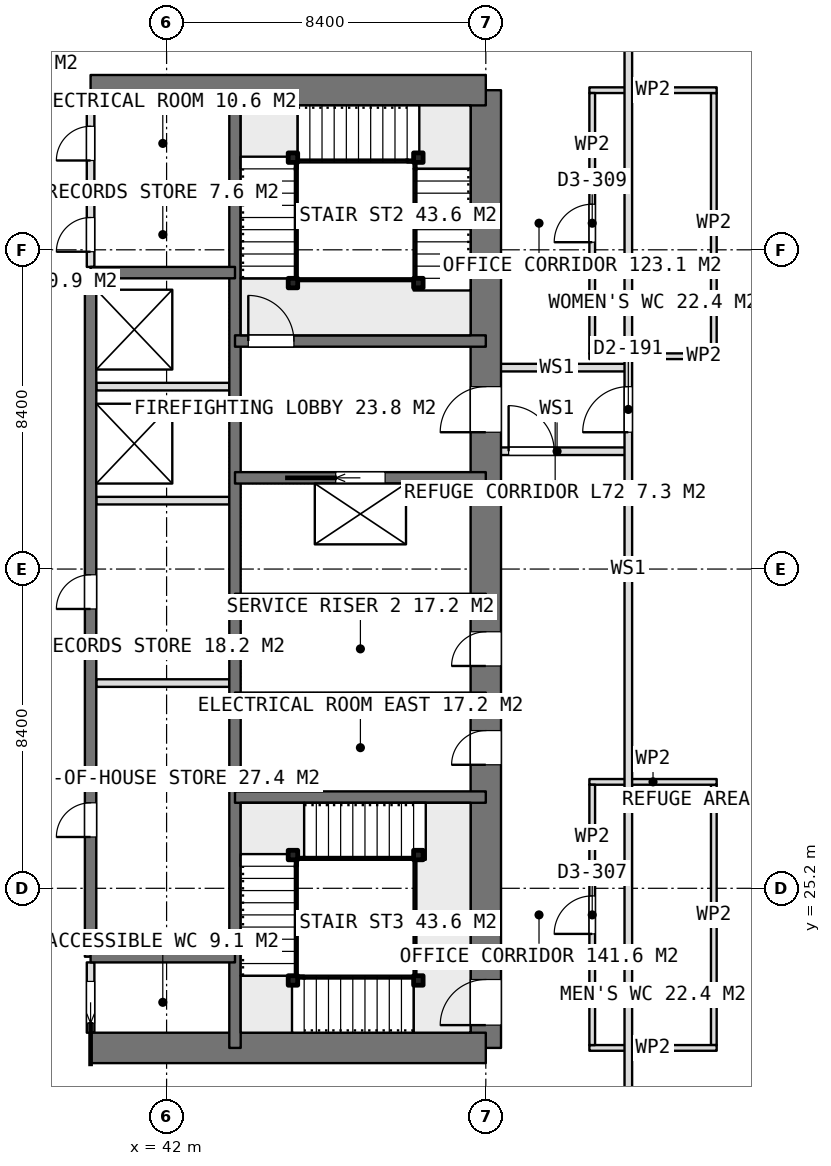
"""IFC4 building model, lengths in metres.
Left out: names, types, materials, properties, quantities, classifications, styles, units other than length and angle.
Written with IfcOpenShell. Run it as: python <this file> out.ifc"""

import sys

from ifc_helpers import new_model, si_unit, direction, frame, frame_2d, origin, origin_2d, place, context, subcontext, project, spatial, rectangle, extrude, element, fill, save


model = new_model("IFC4")
c1 = context("Model", 3, precision=1e-05, world=origin(), true_north=direction((0.0, 1.0)))
c2 = subcontext(c1, "Body", "Model", "MODEL_VIEW")
j1 = project(units=[si_unit("LENGTHUNIT", "METRE"), si_unit("PLANEANGLEUNIT", "RADIAN")], contexts=[c1])
p1 = place(None, origin())
s1 = spatial("IfcSite", under=j1, at=p1, CompositionType="ELEMENT")
p2 = place(p1, origin())
s2 = spatial("IfcBuilding", under=s1, at=p2, CompositionType="ELEMENT")
p3 = place(p2, frame((0.0, 0.0, 283.85)))
s3 = spatial("IfcBuildingStorey", under=s2, at=p3, CompositionType="ELEMENT", Elevation=283.85)
for number, where, z_axis, x_axis in (
    (1, (40.0, 21.0, 0.0), (0.0, 0.0, 1.0), (1.0, 0.0, 0.0)),
    (2, (40.0, 46.2, 0.0), (0.0, 0.0, 1.0), (1.0, 0.0, 0.0)),
):
    element("IfcWall", number, at=place(p3, frame(where, z_axis=z_axis, x_axis=x_axis)), inside=s3, PredefinedType="SHEAR", context=c2, shape_type="SweptSolid", body=[
        extrude(rectangle(XDim=10.4, YDim=0.8, at=frame_2d((5.2, 0.0))), origin(), (0.0, 0.0, 1.0), 3.75),
    ])
p4 = place(p3, frame((50.4, 21.0, 0.0), z_axis=(0.0, 0.0, 1.0), x_axis=(0.0, 1.0, 0.0)))
e3 = element("IfcWall", 3, at=p4, inside=s3, PredefinedType="SHEAR", context=c2, shape_type="SweptSolid", body=[
    extrude(rectangle(XDim=25.2, YDim=0.8, at=frame_2d((12.6, 0.0))), origin(), (0.0, 0.0, 1.0), 3.75),
])
p5 = place(p4, frame((16.2, 0.0, 0.0)))
e4 = element("IfcOpeningElement", 4, at=p5, cuts=e3, PredefinedType="OPENING", context=c2, shape_type="SweptSolid", body=[
    extrude(rectangle(XDim=1.2, YDim=2.1, at=frame_2d((0.6, 1.05))), frame((0.0, 0.41, 0.0), z_axis=(0.0, -1.0, 0.0), x_axis=(1.0, 0.0, 0.0)), (0.0, 0.0, 1.0), 0.82),
])
p6 = place(p4, frame((10.05, 0.0, 0.0)))
e5 = element("IfcOpeningElement", 5, at=p6, cuts=e3, PredefinedType="OPENING", context=c2, shape_type="SweptSolid", body=[
    extrude(rectangle(XDim=0.9, YDim=2.1, at=frame_2d((0.45, 1.05))), frame((0.0, 0.41, 0.0), z_axis=(0.0, -1.0, 0.0), x_axis=(1.0, 0.0, 0.0)), (0.0, 0.0, 1.0), 0.82),
])
p7 = place(p4, frame((7.45, 0.0, 0.0)))
e6 = element("IfcOpeningElement", 6, at=p7, cuts=e3, PredefinedType="OPENING", context=c2, shape_type="SweptSolid", body=[
    extrude(rectangle(XDim=0.9, YDim=2.1, at=frame_2d((0.45, 1.05))), frame((0.0, 0.41, 0.0), z_axis=(0.0, -1.0, 0.0), x_axis=(1.0, 0.0, 0.0)), (0.0, 0.0, 1.0), 0.82),
])
p8 = place(p4, frame((0.6, 0.0, 0.0)))
e7 = element("IfcOpeningElement", 7, at=p8, cuts=e3, PredefinedType="OPENING", context=c2, shape_type="SweptSolid", body=[
    extrude(rectangle(XDim=1.2, YDim=2.1, at=frame_2d((0.6, 1.05))), frame((0.0, 0.41, 0.0), z_axis=(0.0, -1.0, 0.0), x_axis=(1.0, 0.0, 0.0)), (0.0, 0.0, 1.0), 0.82),
])
p9 = place(p3, frame((43.8, 21.0, 0.0), z_axis=(0.0, 0.0, 1.0), x_axis=(0.0, 1.0, 0.0)))
e8 = element("IfcWall", 8, at=p9, inside=s3, PredefinedType="SHEAR", context=c2, shape_type="SweptSolid", body=[
    extrude(rectangle(XDim=25.2, YDim=0.3, at=frame_2d((12.6, 0.0))), origin(), (0.0, 0.0, 1.0), 3.75),
])
p10 = place(p3, frame((40.0, 23.4, 0.0), z_axis=(0.0, 0.0, 1.0), x_axis=(0.0, 1.0, 0.0)))
e9 = element("IfcWall", 9, at=p10, inside=s3, PredefinedType="SHEAR", context=c2, shape_type="SweptSolid", body=[
    extrude(rectangle(XDim=18.0, YDim=0.3, at=frame_2d((9.0, 0.0))), origin(), (0.0, 0.0, 1.0), 3.75),
])
p11 = place(p10, frame((3.15, 0.0, 0.0)))
e10 = element("IfcOpeningElement", 10, at=p11, cuts=e9, PredefinedType="OPENING", context=c2, shape_type="SweptSolid", body=[
    extrude(rectangle(XDim=0.9, YDim=2.1, at=frame_2d((0.45, 1.05))), frame((0.0, 0.16, 0.0), z_axis=(0.0, -1.0, 0.0), x_axis=(1.0, 0.0, 0.0)), (0.0, 0.0, 1.0), 0.32),
])
p12 = place(p10, frame((9.15, 0.0, 0.0)))
e11 = element("IfcOpeningElement", 11, at=p12, cuts=e9, PredefinedType="OPENING", context=c2, shape_type="SweptSolid", body=[
    extrude(rectangle(XDim=0.9, YDim=2.1, at=frame_2d((0.45, 1.05))), frame((0.0, 0.16, 0.0), z_axis=(0.0, -1.0, 0.0), x_axis=(1.0, 0.0, 0.0)), (0.0, 0.0, 1.0), 0.32),
])
for number, where, z_axis, x_axis in (
    (12, (40.0, 23.4, 0.0), (0.0, 0.0, 1.0), (1.0, 0.0, 0.0)),
    (13, (40.0, 41.4, 0.0), (0.0, 0.0, 1.0), (1.0, 0.0, 0.0)),
):
    element("IfcWall", number, at=place(p3, frame(where, z_axis=z_axis, x_axis=x_axis)), inside=s3, PredefinedType="SHEAR", context=c2, shape_type="SweptSolid", body=[
        extrude(rectangle(XDim=3.8, YDim=0.3, at=frame_2d((1.9, 0.0))), origin(), (0.0, 0.0, 1.0), 3.75),
    ])
for number, where, z_axis, x_axis in (
    (14, (43.8, 27.6, 0.0), (0.0, 0.0, 1.0), (1.0, 0.0, 0.0)),
    (15, (43.8, 30.2, 0.0), (0.0, 0.0, 1.0), (1.0, 0.0, 0.0)),
    (16, (43.8, 32.8, 0.0), (0.0, 0.0, 1.0), (1.0, 0.0, 0.0)),
):
    element("IfcWall", number, at=place(p3, frame(where, z_axis=z_axis, x_axis=x_axis)), inside=s3, PredefinedType="SHEAR", context=c2, shape_type="SweptSolid", body=[
        extrude(rectangle(XDim=6.6, YDim=0.3, at=frame_2d((3.3, 0.0))), origin(), (0.0, 0.0, 1.0), 3.75),
    ])
p13 = place(p3, frame((43.8, 36.0, 0.0), z_axis=(0.0, 0.0, 1.0), x_axis=(1.0, 0.0, 0.0)))
e17 = element("IfcWall", 17, at=p13, inside=s3, PredefinedType="SHEAR", context=c2, shape_type="SweptSolid", body=[
    extrude(rectangle(XDim=6.6, YDim=0.3, at=frame_2d((3.3, 0.0))), origin(), (0.0, 0.0, 1.0), 3.75),
])
p14 = place(p13, frame((2.65, 0.0, 0.0)))
e18 = element("IfcOpeningElement", 18, at=p14, cuts=e17, PredefinedType="OPENING", context=c2, shape_type="SweptSolid", body=[
    extrude(rectangle(XDim=1.3, YDim=2.1, at=frame_2d((0.65, 1.05))), frame((0.0, 0.16, 0.0), z_axis=(0.0, -1.0, 0.0), x_axis=(1.0, 0.0, 0.0)), (0.0, 0.0, 1.0), 0.32),
])
p15 = place(p3, frame((43.8, 39.6, 0.0), z_axis=(0.0, 0.0, 1.0), x_axis=(1.0, 0.0, 0.0)))
e19 = element("IfcWall", 19, at=p15, inside=s3, PredefinedType="SHEAR", context=c2, shape_type="SweptSolid", body=[
    extrude(rectangle(XDim=6.6, YDim=0.3, at=frame_2d((3.3, 0.0))), origin(), (0.0, 0.0, 1.0), 3.75),
])
p16 = place(p15, frame((0.35, 0.0, 0.0)))
e20 = element("IfcOpeningElement", 20, at=p16, cuts=e19, PredefinedType="OPENING", context=c2, shape_type="SweptSolid", body=[
    extrude(rectangle(XDim=1.2, YDim=2.1, at=frame_2d((0.6, 1.05))), frame((0.0, 0.16, 0.0), z_axis=(0.0, -1.0, 0.0), x_axis=(1.0, 0.0, 0.0)), (0.0, 0.0, 1.0), 0.32),
])
for number, where, z_axis, x_axis in (
    (21, (40.15, 35.4, 0.0), (0.0, 0.0, 1.0), (1.0, 0.0, 0.0)),
    (22, (40.15, 38.4, 0.0), (0.0, 0.0, 1.0), (1.0, 0.0, 0.0)),
):
    element("IfcWall", number, at=place(p3, frame(where, z_axis=z_axis, x_axis=x_axis)), inside=s3, PredefinedType="PARTITIONING", context=c2, shape_type="SweptSolid", body=[
        extrude(rectangle(XDim=3.5, YDim=0.2, at=frame_2d((1.75, 0.0))), origin(), (0.0, 0.0, 1.0), 3.5),
    ])
p17 = place(p3, frame((40.0, 21.4, 0.0), z_axis=(0.0, 0.0, 1.0), x_axis=(0.0, 1.0, 0.0)))
e23 = element("IfcWall", 23, at=p17, inside=s3, PredefinedType="PARTITIONING", context=c2, shape_type="SweptSolid", body=[
    extrude(rectangle(XDim=1.85, YDim=0.2, at=frame_2d((0.925, 0.0))), origin(), (0.0, 0.0, 1.0), 3.5),
])
p18 = place(p17, frame((0.25, 0.0, 0.0)))
e24 = element("IfcOpeningElement", 24, at=p18, cuts=e23, PredefinedType="OPENING", context=c2, shape_type="SweptSolid", body=[
    extrude(rectangle(XDim=1.1, YDim=2.1, at=frame_2d((0.55, 1.05))), frame((0.0, 0.11, 0.0), z_axis=(0.0, -1.0, 0.0), x_axis=(1.0, 0.0, 0.0)), (0.0, 0.0, 1.0), 0.22),
])
p19 = place(p3, frame((40.0, 41.55, 0.0), z_axis=(0.0, 0.0, 1.0), x_axis=(0.0, 1.0, 0.0)))
e25 = element("IfcWall", 25, at=p19, inside=s3, PredefinedType="PARTITIONING", context=c2, shape_type="SweptSolid", body=[
    extrude(rectangle(XDim=4.25, YDim=0.2, at=frame_2d((2.125, 0.0))), origin(), (0.0, 0.0, 1.0), 3.5),
])
p20 = place(p19, frame((2.8, 0.0, 0.0)))
e26 = element("IfcOpeningElement", 26, at=p20, cuts=e25, PredefinedType="OPENING", context=c2, shape_type="SweptSolid", body=[
    extrude(rectangle(XDim=0.9, YDim=2.1, at=frame_2d((0.45, 1.05))), frame((0.0, 0.11, 0.0), z_axis=(0.0, -1.0, 0.0), x_axis=(1.0, 0.0, 0.0)), (0.0, 0.0, 1.0), 0.22),
])
p21 = place(p19, frame((0.4, 0.0, 0.0)))
e27 = element("IfcOpeningElement", 27, at=p21, cuts=e25, PredefinedType="OPENING", context=c2, shape_type="SweptSolid", body=[
    extrude(rectangle(XDim=0.9, YDim=2.1, at=frame_2d((0.45, 1.05))), frame((0.0, 0.11, 0.0), z_axis=(0.0, -1.0, 0.0), x_axis=(1.0, 0.0, 0.0)), (0.0, 0.0, 1.0), 0.22),
])
p22 = place(p3, frame((40.15, 30.6, 0.0), z_axis=(0.0, 0.0, 1.0), x_axis=(1.0, 0.0, 0.0)))
e28 = element("IfcWall", 28, at=p22, inside=s3, PredefinedType="PARTITIONING", context=c2, shape_type="SweptSolid", body=[
    extrude(rectangle(XDim=3.5, YDim=0.2, at=frame_2d((1.75, 0.0))), origin(), (0.0, 0.0, 1.0), 3.5),
])
p23 = place(p3, frame((40.0, 43.4, 0.0), z_axis=(0.0, 0.0, 1.0), x_axis=(1.0, 0.0, 0.0)))
e29 = element("IfcWall", 29, at=p23, inside=s3, PredefinedType="PARTITIONING", context=c2, shape_type="SweptSolid", body=[
    extrude(rectangle(XDim=3.65, YDim=0.2, at=frame_2d((1.825, 0.0))), origin(), (0.0, 0.0, 1.0), 3.5),
])
for number, where, z_axis, x_axis in (
    (30, (53.125, 39.2, 0.0), (0.0, 0.0, 1.0), (1.0, 0.0, 0.0)),
    (31, (53.125, 46.2, 0.0), (0.0, 0.0, 1.0), (1.0, 0.0, 0.0)),
):
    element("IfcWall", number, at=place(p3, frame(where, z_axis=z_axis, x_axis=x_axis)), inside=s3, PredefinedType="PARTITIONING", context=c2, shape_type="SweptSolid", body=[
        extrude(rectangle(XDim=3.35, YDim=0.15, at=frame_2d((1.675, 0.0))), origin(), (0.0, 0.0, 1.0), 3.5),
    ])
p24 = place(p3, frame((53.2, 39.275, 0.0), z_axis=(0.0, 0.0, 1.0), x_axis=(0.0, 1.0, 0.0)))
e32 = element("IfcWall", 32, at=p24, inside=s3, PredefinedType="PARTITIONING", context=c2, shape_type="SweptSolid", body=[
    extrude(rectangle(XDim=6.85, YDim=0.15, at=frame_2d((3.425, 0.0))), origin(), (0.0, 0.0, 1.0), 3.5),
])
p25 = place(p24, frame((2.925, 0.0, 0.0)))
e33 = element("IfcOpeningElement", 33, at=p25, cuts=e32, PredefinedType="OPENING", context=c2, shape_type="SweptSolid", body=[
    extrude(rectangle(XDim=1.0, YDim=2.1, at=frame_2d((0.5, 1.05))), frame((0.0, 0.085, 0.0), z_axis=(0.0, -1.0, 0.0), x_axis=(1.0, 0.0, 0.0)), (0.0, 0.0, 1.0), 0.17),
])
p26 = place(p3, frame((56.4, 39.275, 0.0), z_axis=(0.0, 0.0, 1.0), x_axis=(0.0, 1.0, 0.0)))
e34 = element("IfcWall", 34, at=p26, inside=s3, PredefinedType="PARTITIONING", context=c2, shape_type="SweptSolid", body=[
    extrude(rectangle(XDim=6.85, YDim=0.15, at=frame_2d((3.425, 0.0))), origin(), (0.0, 0.0, 1.0), 3.5),
])
for number, where, z_axis, x_axis in (
    (35, (53.125, 21.0, 0.0), (0.0, 0.0, 1.0), (1.0, 0.0, 0.0)),
    (36, (53.125, 28.0, 0.0), (0.0, 0.0, 1.0), (1.0, 0.0, 0.0)),
):
    element("IfcWall", number, at=place(p3, frame(where, z_axis=z_axis, x_axis=x_axis)), inside=s3, PredefinedType="PARTITIONING", context=c2, shape_type="SweptSolid", body=[
        extrude(rectangle(XDim=3.35, YDim=0.15, at=frame_2d((1.675, 0.0))), origin(), (0.0, 0.0, 1.0), 3.5),
    ])
p27 = place(p3, frame((53.2, 21.075, 0.0), z_axis=(0.0, 0.0, 1.0), x_axis=(0.0, 1.0, 0.0)))
e37 = element("IfcWall", 37, at=p27, inside=s3, PredefinedType="PARTITIONING", context=c2, shape_type="SweptSolid", body=[
    extrude(rectangle(XDim=6.85, YDim=0.15, at=frame_2d((3.425, 0.0))), origin(), (0.0, 0.0, 1.0), 3.5),
])
p28 = place(p27, frame((2.925, 0.0, 0.0)))
e38 = element("IfcOpeningElement", 38, at=p28, cuts=e37, PredefinedType="OPENING", context=c2, shape_type="SweptSolid", body=[
    extrude(rectangle(XDim=1.0, YDim=2.1, at=frame_2d((0.5, 1.05))), frame((0.0, 0.085, 0.0), z_axis=(0.0, -1.0, 0.0), x_axis=(1.0, 0.0, 0.0)), (0.0, 0.0, 1.0), 0.17),
])
p29 = place(p3, frame((56.4, 21.075, 0.0), z_axis=(0.0, 0.0, 1.0), x_axis=(0.0, 1.0, 0.0)))
e39 = element("IfcWall", 39, at=p29, inside=s3, PredefinedType="PARTITIONING", context=c2, shape_type="SweptSolid", body=[
    extrude(rectangle(XDim=6.85, YDim=0.15, at=frame_2d((3.425, 0.0))), origin(), (0.0, 0.0, 1.0), 3.5),
])
for number, where, z_axis, x_axis in (
    (40, (45.325, 41.125, 0.0), (0.0, 0.0, 1.0), (1.0, 0.0, 0.0)),
    (41, (45.325, 44.425, 0.0), (0.0, 0.0, 1.0), (1.0, 0.0, 0.0)),
    (42, (48.625, 44.425, 0.0), (0.0, 0.0, 1.0), (1.0, 0.0, 0.0)),
    (43, (48.625, 41.125, 0.0), (0.0, 0.0, 1.0), (1.0, 0.0, 0.0)),
    (44, (48.625, 22.775, 0.0), (0.0, 0.0, 1.0), (1.0, 0.0, 0.0)),
    (45, (45.325, 22.775, 0.0), (0.0, 0.0, 1.0), (1.0, 0.0, 0.0)),
    (46, (45.325, 26.075, 0.0), (0.0, 0.0, 1.0), (1.0, 0.0, 0.0)),
    (47, (48.625, 26.075, 0.0), (0.0, 0.0, 1.0), (1.0, 0.0, 0.0)),
):
    element("IfcColumn", number, at=place(p3, frame(where, z_axis=z_axis, x_axis=x_axis)), inside=s3, PredefinedType="COLUMN", context=c2, shape_type="SweptSolid", body=[
        extrude(rectangle(XDim=0.25, YDim=0.25, at=origin_2d()), origin(), (0.0, 0.0, 1.0), 3.75),
    ])
p30 = place(p3, frame((54.15, 15.602, 0.0), z_axis=(0.0, 0.0, 1.0), x_axis=(0.0, 1.0, 0.0)))
e48 = element("IfcWall", 48, at=p30, inside=s3, PredefinedType="PARTITIONING", context=c2, shape_type="SweptSolid", body=[
    extrude(rectangle(XDim=35.995, YDim=0.2, at=frame_2d((17.998, 0.0))), origin(), (0.0, 0.0, 1.0), 3.5),
])
p31 = place(p30, frame((21.598, 0.0, 0.0)))
e49 = element("IfcOpeningElement", 49, at=p31, cuts=e48, PredefinedType="OPENING", context=c2, shape_type="SweptSolid", body=[
    extrude(rectangle(XDim=1.2, YDim=2.1, at=frame_2d((0.6, 1.05))), frame((0.0, 0.11, 0.0), z_axis=(0.0, -1.0, 0.0), x_axis=(1.0, 0.0, 0.0)), (0.0, 0.0, 1.0), 0.22),
])
p32 = place(p3, frame((50.4, 38.9, 0.0), z_axis=(0.0, 0.0, 1.0), x_axis=(1.0, 0.0, 0.0)))
e50 = element("IfcWall", 50, at=p32, inside=s3, PredefinedType="PARTITIONING", context=c2, shape_type="SweptSolid", body=[
    extrude(rectangle(XDim=3.75, YDim=0.2, at=frame_2d((1.875, 0.0))), origin(), (0.0, 0.0, 1.0), 3.5),
])
p33 = place(p3, frame((50.4, 36.7, 0.0), z_axis=(0.0, 0.0, 1.0), x_axis=(1.0, 0.0, 0.0)))
e51 = element("IfcWall", 51, at=p33, inside=s3, PredefinedType="PARTITIONING", context=c2, shape_type="SweptSolid", body=[
    extrude(rectangle(XDim=3.75, YDim=0.2, at=frame_2d((1.875, 0.0))), origin(), (0.0, 0.0, 1.0), 3.5),
])
p34 = place(p33, frame((0.6, 0.0, 0.0)))
e52 = element("IfcOpeningElement", 52, at=p34, cuts=e51, PredefinedType="OPENING", context=c2, shape_type="SweptSolid", body=[
    extrude(rectangle(XDim=1.2, YDim=2.1, at=frame_2d((0.6, 1.05))), frame((0.0, 0.11, 0.0), z_axis=(0.0, -1.0, 0.0), x_axis=(1.0, 0.0, 0.0)), (0.0, 0.0, 1.0), 0.22),
])
p35 = place(p5, origin())
e53 = element("IfcDoor", 53, at=p35, inside=s3, OperationType="SINGLE_SWING_LEFT", PredefinedType="DOOR", context=c2, shape_type="SweptSolid", body=[
    extrude(rectangle(XDim=1.2, YDim=2.1, at=frame_2d((0.6, 1.05))), frame((0.0, 0.025, 0.0), z_axis=(0.0, -1.0, 0.0), x_axis=(1.0, 0.0, 0.0)), (0.0, 0.0, 1.0), 0.05),
])
fill(e4, e53)
p36 = place(p6, origin())
e54 = element("IfcDoor", 54, at=p36, inside=s3, OperationType="SINGLE_SWING_LEFT", PredefinedType="DOOR", context=c2, shape_type="SweptSolid", body=[
    extrude(rectangle(XDim=0.9, YDim=2.1, at=frame_2d((0.45, 1.05))), frame((0.0, 0.025, 0.0), z_axis=(0.0, -1.0, 0.0), x_axis=(1.0, 0.0, 0.0)), (0.0, 0.0, 1.0), 0.05),
])
fill(e5, e54)
p37 = place(p7, origin())
e55 = element("IfcDoor", 55, at=p37, inside=s3, OperationType="SINGLE_SWING_LEFT", PredefinedType="DOOR", context=c2, shape_type="SweptSolid", body=[
    extrude(rectangle(XDim=0.9, YDim=2.1, at=frame_2d((0.45, 1.05))), frame((0.0, 0.025, 0.0), z_axis=(0.0, -1.0, 0.0), x_axis=(1.0, 0.0, 0.0)), (0.0, 0.0, 1.0), 0.05),
])
fill(e6, e55)
p38 = place(p18, origin())
e56 = element("IfcDoor", 56, at=p38, inside=s3, OperationType="SLIDING_TO_LEFT", PredefinedType="DOOR", context=c2, shape_type="SweptSolid", body=[
    extrude(rectangle(XDim=1.1, YDim=2.1, at=frame_2d((0.55, 1.05))), frame((0.0, 0.025, 0.0), z_axis=(0.0, -1.0, 0.0), x_axis=(1.0, 0.0, 0.0)), (0.0, 0.0, 1.0), 0.05),
])
fill(e24, e56)
p39 = place(p20, origin())
e57 = element("IfcDoor", 57, at=p39, inside=s3, OperationType="SINGLE_SWING_LEFT", PredefinedType="DOOR", context=c2, shape_type="SweptSolid", body=[
    extrude(rectangle(XDim=0.9, YDim=2.1, at=frame_2d((0.45, 1.05))), frame((0.0, 0.025, 0.0), z_axis=(0.0, -1.0, 0.0), x_axis=(1.0, 0.0, 0.0)), (0.0, 0.0, 1.0), 0.05),
])
fill(e26, e57)
p40 = place(p21, origin())
e58 = element("IfcDoor", 58, at=p40, inside=s3, OperationType="SINGLE_SWING_LEFT", PredefinedType="DOOR", context=c2, shape_type="SweptSolid", body=[
    extrude(rectangle(XDim=0.9, YDim=2.1, at=frame_2d((0.45, 1.05))), frame((0.0, 0.025, 0.0), z_axis=(0.0, -1.0, 0.0), x_axis=(1.0, 0.0, 0.0)), (0.0, 0.0, 1.0), 0.05),
])
fill(e27, e58)
p41 = place(p11, origin())
e59 = element("IfcDoor", 59, at=p41, inside=s3, OperationType="SINGLE_SWING_LEFT", PredefinedType="DOOR", context=c2, shape_type="SweptSolid", body=[
    extrude(rectangle(XDim=0.9, YDim=2.1, at=frame_2d((0.45, 1.05))), frame((0.0, 0.025, 0.0), z_axis=(0.0, -1.0, 0.0), x_axis=(1.0, 0.0, 0.0)), (0.0, 0.0, 1.0), 0.05),
])
fill(e10, e59)
p42 = place(p12, origin())
e60 = element("IfcDoor", 60, at=p42, inside=s3, OperationType="SINGLE_SWING_LEFT", PredefinedType="DOOR", context=c2, shape_type="SweptSolid", body=[
    extrude(rectangle(XDim=0.9, YDim=2.1, at=frame_2d((0.45, 1.05))), frame((0.0, 0.025, 0.0), z_axis=(0.0, -1.0, 0.0), x_axis=(1.0, 0.0, 0.0)), (0.0, 0.0, 1.0), 0.05),
])
fill(e11, e60)
p43 = place(p14, origin())
e61 = element("IfcDoor", 61, at=p43, inside=s3, OperationType="SLIDING_TO_LEFT", PredefinedType="USERDEFINED", context=c2, shape_type="SweptSolid", body=[
    extrude(rectangle(XDim=1.3, YDim=2.1, at=frame_2d((0.65, 1.05))), frame((0.0, 0.025, 0.0), z_axis=(0.0, -1.0, 0.0), x_axis=(1.0, 0.0, 0.0)), (0.0, 0.0, 1.0), 0.05),
])
fill(e18, e61)
p44 = place(p25, origin())
e62 = element("IfcDoor", 62, at=p44, inside=s3, OperationType="SINGLE_SWING_LEFT", PredefinedType="DOOR", context=c2, shape_type="SweptSolid", body=[
    extrude(rectangle(XDim=1.0, YDim=2.1, at=frame_2d((0.5, 1.05))), frame((0.0, 0.025, 0.0), z_axis=(0.0, -1.0, 0.0), x_axis=(1.0, 0.0, 0.0)), (0.0, 0.0, 1.0), 0.05),
])
fill(e33, e62)
p45 = place(p28, origin())
e63 = element("IfcDoor", 63, at=p45, inside=s3, OperationType="SINGLE_SWING_LEFT", PredefinedType="DOOR", context=c2, shape_type="SweptSolid", body=[
    extrude(rectangle(XDim=1.0, YDim=2.1, at=frame_2d((0.5, 1.05))), frame((0.0, 0.025, 0.0), z_axis=(0.0, -1.0, 0.0), x_axis=(1.0, 0.0, 0.0)), (0.0, 0.0, 1.0), 0.05),
])
fill(e38, e63)
p46 = place(p16, origin())
e64 = element("IfcDoor", 64, at=p46, inside=s3, OperationType="SINGLE_SWING_RIGHT", PredefinedType="DOOR", context=c2, shape_type="SweptSolid", body=[
    extrude(rectangle(XDim=1.2, YDim=2.1, at=frame_2d((0.6, 1.05))), frame((0.0, 0.025, 0.0), z_axis=(0.0, -1.0, 0.0), x_axis=(1.0, 0.0, 0.0)), (0.0, 0.0, 1.0), 0.05),
])
fill(e20, e64)
p47 = place(p8, origin())
e65 = element("IfcDoor", 65, at=p47, inside=s3, OperationType="SINGLE_SWING_RIGHT", PredefinedType="DOOR", context=c2, shape_type="SweptSolid", body=[
    extrude(rectangle(XDim=1.2, YDim=2.1, at=frame_2d((0.6, 1.05))), frame((0.0, 0.025, 0.0), z_axis=(0.0, -1.0, 0.0), x_axis=(1.0, 0.0, 0.0)), (0.0, 0.0, 1.0), 0.05),
])
fill(e7, e65)
p48 = place(p31, origin())
e66 = element("IfcDoor", 66, at=p48, inside=s3, OperationType="SINGLE_SWING_LEFT", PredefinedType="DOOR", context=c2, shape_type="SweptSolid", body=[
    extrude(rectangle(XDim=1.2, YDim=2.1, at=frame_2d((0.6, 1.05))), frame((0.0, 0.025, 0.0), z_axis=(0.0, -1.0, 0.0), x_axis=(1.0, 0.0, 0.0)), (0.0, 0.0, 1.0), 0.05),
])
fill(e49, e66)
p49 = place(p34, origin())
e67 = element("IfcDoor", 67, at=p49, inside=s3, OperationType="SINGLE_SWING_LEFT", PredefinedType="DOOR", context=c2, shape_type="SweptSolid", body=[
    extrude(rectangle(XDim=1.2, YDim=2.1, at=frame_2d((0.6, 1.05))), frame((0.0, 0.025, 0.0), z_axis=(0.0, -1.0, 0.0), x_axis=(1.0, 0.0, 0.0)), (0.0, 0.0, 1.0), 0.05),
])
fill(e52, e67)
save(model, sys.argv[1])
